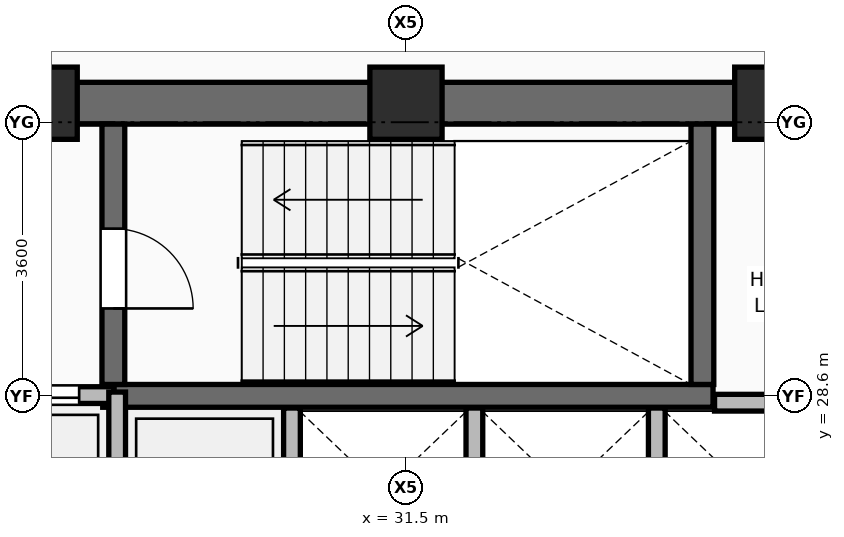
"""IFC4 building model, lengths in metres.
Left out: names, types, materials, properties, quantities, classifications, styles, units other than length and angle.
Written with IfcOpenShell. Run it as: python <this file> out.ifc"""

import sys

from ifc_helpers import new_model, si_unit, direction, frame, frame_2d, origin, origin_2d, place, context, subcontext, project, spatial, rectangle, extrude, element, fill, save


model = new_model("IFC4")
c1 = context("Model", 3, precision=1e-05, world=origin(), true_north=direction((0.0, 1.0)))
c2 = subcontext(c1, "Body", "Model", "MODEL_VIEW")
j1 = project(units=[si_unit("LENGTHUNIT", "METRE"), si_unit("PLANEANGLEUNIT", "RADIAN")], contexts=[c1])
p1 = place(None, origin())
s1 = spatial("IfcSite", under=j1, at=p1, CompositionType="ELEMENT")
p2 = place(p1, origin())
s2 = spatial("IfcBuilding", under=s1, at=p2, CompositionType="ELEMENT")
p3 = place(p2, frame((0.0, 0.0, 142.2)))
s3 = spatial("IfcBuildingStorey", under=s2, at=p3, CompositionType="ELEMENT", Elevation=142.2)
for number, where, z_axis, x_axis in (
    (1, (26.7, 32.45, 0.0), (0.0, 0.0, 1.0), (1.0, 0.0, 0.0)),
    (2, (31.5, 32.45, 0.0), (0.0, 0.0, 1.0), (1.0, 0.0, 0.0)),
    (3, (36.3, 32.45, 0.0), (0.0, 0.0, 1.0), (1.0, 0.0, 0.0)),
):
    element("IfcColumn", number, at=place(p3, frame(where, z_axis=z_axis, x_axis=x_axis)), inside=s3, PredefinedType="COLUMN", context=c2, shape_type="SweptSolid", body=[
        extrude(rectangle(XDim=0.95, YDim=0.95, at=origin_2d()), origin(), (0.0, 0.0, 1.0), 3.75),
    ])
p4 = place(p3, frame((30.0, 25.71, 0.0), z_axis=(0.0, 0.0, 1.0), x_axis=(0.0, 1.0, 0.0)))
e4 = element("IfcWall", 4, at=p4, inside=s3, PredefinedType="PARTITIONING", context=c2, shape_type="SweptSolid", body=[
    extrude(rectangle(XDim=2.73, YDim=0.22, at=frame_2d((1.365, 0.0))), origin(), (0.0, 0.0, 1.0), 3.545),
])
p5 = place(p3, frame((32.4, 26.2, 0.0), z_axis=(0.0, 0.0, 1.0), x_axis=(0.0, 1.0, 0.0)))
e5 = element("IfcWall", 5, at=p5, inside=s3, PredefinedType="PARTITIONING", context=c2, shape_type="SweptSolid", body=[
    extrude(rectangle(XDim=2.24, YDim=0.22, at=frame_2d((1.12, 0.0))), origin(), (0.0, 0.0, 1.0), 3.545),
])
p6 = place(p3, frame((34.8, 26.23, 0.0), z_axis=(0.0, 0.0, 1.0), x_axis=(0.0, 1.0, 0.0)))
e6 = element("IfcWall", 6, at=p6, inside=s3, PredefinedType="PARTITIONING", context=c2, shape_type="SweptSolid", body=[
    extrude(rectangle(XDim=2.21, YDim=0.22, at=frame_2d((1.105, 0.0))), origin(), (0.0, 0.0, 1.0), 3.545),
])
p7 = place(p3, frame((21.625, 32.45, 0.0), z_axis=(0.0, 0.0, 1.0), x_axis=(1.0, 0.0, 0.0)))
e7 = element("IfcWall", 7, at=p7, inside=s3, PredefinedType="SHEAR", context=c2, shape_type="SweptSolid", body=[
    extrude(rectangle(XDim=19.75, YDim=0.55, at=frame_2d((9.875, 0.0))), origin(), (0.0, 0.0, 1.0), 3.57),
])
p8 = place(p7, frame((2.125, 0.0, 0.0)))
e8 = element("IfcOpeningElement", 8, at=p8, cuts=e7, PredefinedType="OPENING", context=c2, shape_type="SweptSolid", body=[
    extrude(rectangle(XDim=1.1, YDim=2.1, at=frame_2d((0.55, 1.05))), frame((0.0, 0.285, 0.0), z_axis=(0.0, -1.0, 0.0), x_axis=(1.0, 0.0, 0.0)), (0.0, 0.0, 1.0), 0.57),
])
p9 = place(p7, frame((15.515, 0.0, 0.0)))
e9 = element("IfcOpeningElement", 9, at=p9, cuts=e7, PredefinedType="OPENING", context=c2, shape_type="SweptSolid", body=[
    extrude(rectangle(XDim=1.0, YDim=2.1, at=frame_2d((0.5, 1.05))), frame((0.0, 0.285, 0.0), z_axis=(0.0, -1.0, 0.0), x_axis=(1.0, 0.0, 0.0)), (0.0, 0.0, 1.0), 0.57),
])
p10 = place(p7, frame((17.525, 0.0, 0.0)))
e10 = element("IfcOpeningElement", 10, at=p10, cuts=e7, PredefinedType="OPENING", context=c2, shape_type="SweptSolid", body=[
    extrude(rectangle(XDim=0.9, YDim=2.1, at=frame_2d((0.45, 1.05))), frame((0.0, 0.285, 0.0), z_axis=(0.0, -1.0, 0.0), x_axis=(1.0, 0.0, 0.0)), (0.0, 0.0, 1.0), 0.57),
])
p11 = place(p3, frame((27.51, 28.6, 0.0), z_axis=(0.0, 0.0, 1.0), x_axis=(1.0, 0.0, 0.0)))
e11 = element("IfcWall", 11, at=p11, inside=s3, PredefinedType="SHEAR", context=c2, shape_type="SweptSolid", body=[
    extrude(rectangle(XDim=8.03, YDim=0.3, at=frame_2d((4.015, 0.0))), origin(), (0.0, 0.0, 1.0), 3.57),
])
p12 = place(p3, frame((27.65, 28.75, 0.0), z_axis=(0.0, 0.0, 1.0), x_axis=(0.0, 1.0, 0.0)))
e12 = element("IfcWall", 12, at=p12, inside=s3, PredefinedType="SHEAR", context=c2, shape_type="SweptSolid", body=[
    extrude(rectangle(XDim=3.425, YDim=0.3, at=frame_2d((1.712, 0.0))), origin(), (0.0, 0.0, 1.0), 3.57),
])
p13 = place(p12, frame((1.0, 0.0, 0.0)))
e13 = element("IfcOpeningElement", 13, at=p13, cuts=e12, PredefinedType="OPENING", context=c2, shape_type="SweptSolid", body=[
    extrude(rectangle(XDim=1.05, YDim=2.1, at=frame_2d((0.525, 1.05))), frame((0.0, 0.16, 0.0), z_axis=(0.0, -1.0, 0.0), x_axis=(1.0, 0.0, 0.0)), (0.0, 0.0, 1.0), 0.32),
])
p14 = place(p3, frame((35.4, 28.75, 0.0), z_axis=(0.0, 0.0, 1.0), x_axis=(0.0, 1.0, 0.0)))
e14 = element("IfcWall", 14, at=p14, inside=s3, PredefinedType="SHEAR", context=c2, shape_type="SweptSolid", body=[
    extrude(rectangle(XDim=3.425, YDim=0.3, at=frame_2d((1.712, 0.0))), origin(), (0.0, 0.0, 1.0), 3.57),
])
p15 = place(p3, frame((25.64, 28.61, 0.0), z_axis=(0.0, 0.0, 1.0), x_axis=(1.0, 0.0, 0.0)))
e15 = element("IfcWall", 15, at=p15, inside=s3, PredefinedType="PARTITIONING", context=c2, shape_type="SweptSolid", body=[
    extrude(rectangle(XDim=2.02, YDim=0.22, at=frame_2d((1.01, 0.0))), origin(), (0.0, 0.0, 1.0), 3.55),
])
p16 = place(p15, frame((0.46, 0.0, 0.0)))
e16 = element("IfcOpeningElement", 16, at=p16, cuts=e15, PredefinedType="OPENING", context=c2, shape_type="SweptSolid", body=[
    extrude(rectangle(XDim=1.1, YDim=2.2, at=frame_2d((0.55, 1.1))), frame((0.0, 0.12, 0.0), z_axis=(0.0, -1.0, 0.0), x_axis=(1.0, 0.0, 0.0)), (0.0, 0.0, 1.0), 0.24),
])
p17 = place(p3, frame((35.56, 28.51, 0.0), z_axis=(0.0, 0.0, 1.0), x_axis=(1.0, 0.0, 0.0)))
e17 = element("IfcWall", 17, at=p17, inside=s3, PredefinedType="PARTITIONING", context=c2, shape_type="SweptSolid", body=[
    extrude(rectangle(XDim=1.6, YDim=0.22, at=frame_2d((0.8, 0.0))), origin(), (0.0, 0.0, 1.0), 3.55),
])
p18 = place(p3, frame((27.7, 25.65, 0.0), z_axis=(0.0, 0.0, 1.0), x_axis=(0.0, 1.0, 0.0)))
e18 = element("IfcWall", 18, at=p18, inside=s3, PredefinedType="PARTITIONING", context=c2, shape_type="SweptSolid", body=[
    extrude(rectangle(XDim=3.0, YDim=0.22, at=frame_2d((1.5, 0.0))), origin(), (0.0, 0.0, 1.0), 3.55),
])
p19 = place(p13, frame((1.05, 0.0, 0.0), z_axis=(0.0, 0.0, 1.0), x_axis=(-1.0, 0.0, 0.0)))
e19 = element("IfcDoor", 19, at=p19, inside=s3, OperationType="SINGLE_SWING_RIGHT", PredefinedType="DOOR", context=c2, shape_type="SweptSolid", body=[
    extrude(rectangle(XDim=1.05, YDim=2.1, at=frame_2d((0.525, 1.05))), frame((0.0, 0.025, 0.0), z_axis=(0.0, -1.0, 0.0), x_axis=(1.0, 0.0, 0.0)), (0.0, 0.0, 1.0), 0.05),
])
fill(e13, e19)
p20 = place(p16, origin())
e20 = element("IfcDoor", 20, at=p20, inside=s3, OperationType="DOUBLE_DOOR_SLIDING", PredefinedType="DOOR", context=c2, shape_type="SweptSolid", body=[
    extrude(rectangle(XDim=1.1, YDim=2.2, at=frame_2d((0.55, 1.1))), frame((0.0, 0.025, 0.0), z_axis=(0.0, -1.0, 0.0), x_axis=(1.0, 0.0, 0.0)), (0.0, 0.0, 1.0), 0.05),
])
fill(e16, e20)
save(model, sys.argv[1])
